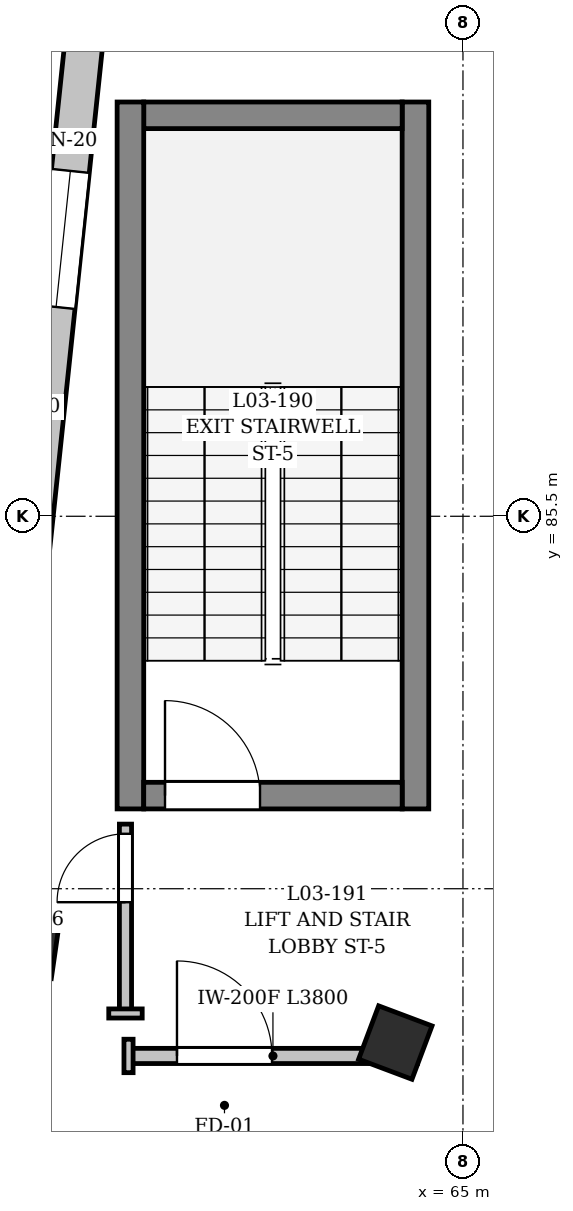
"""IFC4 building model, lengths in metres.
Left out: names, types, materials, properties, quantities, classifications, styles, units other than length and angle.
Written with IfcOpenShell. Run it as: python <this file> out.ifc"""

import sys

from ifc_helpers import new_model, si_unit, direction, frame, frame_2d, origin, origin_2d, place, context, subcontext, project, spatial, rectangle, extrude, element, fill, save


model = new_model("IFC4")
c1 = context("Model", 3, precision=1e-05, world=origin(), true_north=direction((0.0, 1.0)))
c2 = subcontext(c1, "Body", "Model", "MODEL_VIEW")
j1 = project(units=[si_unit("LENGTHUNIT", "METRE"), si_unit("PLANEANGLEUNIT", "RADIAN")], contexts=[c1])
p1 = place(None, origin())
s1 = spatial("IfcSite", under=j1, at=p1, CompositionType="ELEMENT")
p2 = place(p1, origin())
s2 = spatial("IfcBuilding", under=s1, at=p2, CompositionType="ELEMENT")
p3 = place(p2, frame((0.0, 0.0, 10.2)))
s3 = spatial("IfcBuildingStorey", under=s2, at=p3, CompositionType="ELEMENT", Elevation=10.2)
p4 = place(p3, frame((64.11, 78.576, 0.0), z_axis=(0.0, 0.0, 1.0), x_axis=(0.351841648405, 0.936059535739, 0.0)))
e1 = element("IfcColumn", 1, at=p4, inside=s3, PredefinedType="COLUMN", context=c2, shape_type="SweptSolid", body=[
    extrude(rectangle(XDim=0.75, YDim=0.75, at=origin_2d()), origin(), (0.0, 0.0, 1.0), 4.52),
])
p5 = place(p3, frame((59.288, 79.814, 0.0), z_axis=(0.0, 0.0, 1.0), x_axis=(0.142628933706, 0.989776230908, 0.0)))
e2 = element("IfcColumn", 2, at=p5, inside=s3, PredefinedType="COLUMN", context=c2, shape_type="SweptSolid", body=[
    extrude(rectangle(XDim=0.7, YDim=0.7, at=origin_2d()), origin(), (0.0, 0.0, 1.0), 4.52),
])
p6 = place(p3, frame((59.429, 94.029, 0.0), z_axis=(0.0, 0.0, 1.0), x_axis=(-0.104535162797, -0.994521191197, 0.0)))
e3 = element("IfcWall", 3, at=p6, inside=s3, PredefinedType="SOLIDWALL", context=c2, shape_type="SweptSolid", body=[
    extrude(rectangle(XDim=14.27, YDim=0.48, at=frame_2d((7.135, 0.0))), origin(), (0.0, 0.0, 1.0), 3.51),
])
p7 = place(p6, frame((2.835, 0.0, 0.9)))
e4 = element("IfcOpeningElement", 4, at=p7, cuts=e3, PredefinedType="OPENING", context=c2, shape_type="SweptSolid", body=[
    extrude(rectangle(XDim=1.4, YDim=2.05, at=frame_2d((0.7, 1.025))), frame((0.0, 0.25, 0.0), z_axis=(0.0, -1.0, 0.0), x_axis=(1.0, 0.0, 0.0)), (0.0, 0.0, 1.0), 0.5),
])
p8 = place(p6, frame((6.435, 0.0, 0.9)))
e5 = element("IfcOpeningElement", 5, at=p8, cuts=e3, PredefinedType="OPENING", context=c2, shape_type="SweptSolid", body=[
    extrude(rectangle(XDim=1.4, YDim=2.05, at=frame_2d((0.7, 1.025))), frame((0.0, 0.25, 0.0), z_axis=(0.0, -1.0, 0.0), x_axis=(1.0, 0.0, 0.0)), (0.0, 0.0, 1.0), 0.5),
])
p9 = place(p6, frame((10.035, 0.0, 0.9)))
e6 = element("IfcOpeningElement", 6, at=p9, cuts=e3, PredefinedType="OPENING", context=c2, shape_type="SweptSolid", body=[
    extrude(rectangle(XDim=1.4, YDim=2.05, at=frame_2d((0.7, 1.025))), frame((0.0, 0.25, 0.0), z_axis=(0.0, -1.0, 0.0), x_axis=(1.0, 0.0, 0.0)), (0.0, 0.0, 1.0), 0.5),
])
p10 = place(p3, frame((59.311, 85.06, 0.0), z_axis=(0.0, 0.0, 1.0), x_axis=(0.104529993567, 0.994521734526, 0.0)))
e7 = element("IfcWall", 7, at=p10, inside=s3, PredefinedType="SOLIDWALL", context=c2, shape_type="SweptSolid", body=[
    extrude(rectangle(XDim=11.823, YDim=0.5, at=frame_2d((5.911, 0.0))), origin(), (0.0, 0.0, 1.0), 4.52),
])
p11 = place(p10, frame((3.211, 0.0, 0.9)))
e8 = element("IfcOpeningElement", 8, at=p11, cuts=e7, PredefinedType="OPENING", context=c2, shape_type="SweptSolid", body=[
    extrude(rectangle(XDim=1.8, YDim=2.1, at=frame_2d((0.9, 1.05))), frame((0.0, 0.26, 0.0), z_axis=(0.0, -1.0, 0.0), x_axis=(1.0, 0.0, 0.0)), (0.0, 0.0, 1.0), 0.52),
])
p12 = place(p10, frame((6.811, 0.0, 0.9)))
e9 = element("IfcOpeningElement", 9, at=p12, cuts=e7, PredefinedType="OPENING", context=c2, shape_type="SweptSolid", body=[
    extrude(rectangle(XDim=1.8, YDim=2.1, at=frame_2d((0.9, 1.05))), frame((0.0, 0.26, 0.0), z_axis=(0.0, -1.0, 0.0), x_axis=(1.0, 0.0, 0.0)), (0.0, 0.0, 1.0), 0.52),
])
p13 = place(p3, frame((64.375, 81.65, 0.0), z_axis=(0.0, 0.0, 1.0), x_axis=(0.0, 1.0, 0.0)))
e10 = element("IfcWall", 10, at=p13, inside=s3, PredefinedType="SHEAR", context=c2, shape_type="SweptSolid", body=[
    extrude(rectangle(XDim=9.3, YDim=0.35, at=frame_2d((4.65, 0.0))), origin(), (0.0, 0.0, 1.0), 4.52),
])
p14 = place(p3, frame((64.2, 90.775, 0.0), z_axis=(0.0, 0.0, 1.0), x_axis=(-1.0, 0.0, 0.0)))
e11 = element("IfcWall", 11, at=p14, inside=s3, PredefinedType="SHEAR", context=c2, shape_type="SweptSolid", body=[
    extrude(rectangle(XDim=3.4, YDim=0.35, at=frame_2d((1.7, 0.0))), origin(), (0.0, 0.0, 1.0), 4.52),
])
p15 = place(p3, frame((60.625, 90.95, 0.0), z_axis=(0.0, 0.0, 1.0), x_axis=(0.0, -1.0, 0.0)))
e12 = element("IfcWall", 12, at=p15, inside=s3, PredefinedType="SHEAR", context=c2, shape_type="SweptSolid", body=[
    extrude(rectangle(XDim=9.3, YDim=0.35, at=frame_2d((4.65, 0.0))), origin(), (0.0, 0.0, 1.0), 4.52),
])
p16 = place(p3, frame((60.8, 81.825, 0.0), z_axis=(0.0, 0.0, 1.0), x_axis=(1.0, 0.0, 0.0)))
e13 = element("IfcWall", 13, at=p16, inside=s3, PredefinedType="SHEAR", context=c2, shape_type="SweptSolid", body=[
    extrude(rectangle(XDim=3.4, YDim=0.35, at=frame_2d((1.7, 0.0))), origin(), (0.0, 0.0, 1.0), 4.52),
])
p17 = place(p16, frame((0.28, 0.0, 0.0)))
e14 = element("IfcOpeningElement", 14, at=p17, cuts=e13, PredefinedType="OPENING", context=c2, shape_type="SweptSolid", body=[
    extrude(rectangle(XDim=1.25, YDim=2.2, at=frame_2d((0.625, 1.1))), frame((0.0, 0.185, 0.0), z_axis=(0.0, -1.0, 0.0), x_axis=(1.0, 0.0, 0.0)), (0.0, 0.0, 1.0), 0.37),
])
p18 = place(p3, frame((60.6, 78.4, 0.0), z_axis=(0.0, 0.0, 1.0), x_axis=(1.0, 0.0, 0.0)))
e15 = element("IfcWall", 15, at=p18, inside=s3, PredefinedType="PARTITIONING", context=c2, shape_type="SweptSolid", body=[
    extrude(rectangle(XDim=3.8, YDim=0.2, at=frame_2d((1.9, 0.0))), origin(), (0.0, 0.0, 1.0), 3.56),
])
p19 = place(p18, frame((0.637, 0.0, 0.0)))
e16 = element("IfcOpeningElement", 16, at=p19, cuts=e15, PredefinedType="OPENING", context=c2, shape_type="SweptSolid", body=[
    extrude(rectangle(XDim=1.25, YDim=2.2, at=frame_2d((0.625, 1.1))), frame((0.0, 0.11, 0.0), z_axis=(0.0, -1.0, 0.0), x_axis=(1.0, 0.0, 0.0)), (0.0, 0.0, 1.0), 0.22),
])
p20 = place(p3, frame((60.56, 78.959, 0.0), z_axis=(0.0, 0.0, 1.0), x_axis=(0.0, 1.0, 0.0)))
e17 = element("IfcWall", 17, at=p20, inside=s3, PredefinedType="PARTITIONING", context=c2, shape_type="SweptSolid", body=[
    extrude(rectangle(XDim=2.491, YDim=0.16, at=frame_2d((1.246, 0.0))), origin(), (0.0, 0.0, 1.0), 3.91),
])
p21 = place(p20, frame((1.464, 0.0, 0.0)))
e18 = element("IfcOpeningElement", 18, at=p21, cuts=e17, PredefinedType="OPENING", context=c2, shape_type="SweptSolid", body=[
    extrude(rectangle(XDim=0.9, YDim=2.1, at=frame_2d((0.45, 1.05))), frame((0.0, 0.09, 0.0), z_axis=(0.0, -1.0, 0.0), x_axis=(1.0, 0.0, 0.0)), (0.0, 0.0, 1.0), 0.18),
])
p22 = place(p3, frame((60.6, 78.18, 0.0), z_axis=(0.0, 0.0, 1.0), x_axis=(0.0, 1.0, 0.0)))
e19 = element("IfcWall", 19, at=p22, inside=s3, PredefinedType="PARTITIONING", context=c2, shape_type="SweptSolid", body=[
    extrude(rectangle(XDim=0.44, YDim=0.12, at=frame_2d((0.22, 0.0))), origin(), (0.0, 0.0, 1.0), 3.91),
])
p23 = place(p3, frame((60.78, 78.959, 0.0), z_axis=(0.0, 0.0, 1.0), x_axis=(-1.0, 0.0, 0.0)))
e20 = element("IfcWall", 20, at=p23, inside=s3, PredefinedType="PARTITIONING", context=c2, shape_type="SweptSolid", body=[
    extrude(rectangle(XDim=0.44, YDim=0.12, at=frame_2d((0.22, 0.0))), origin(), (0.0, 0.0, 1.0), 4.52),
])
p24 = place(p11, origin())
e21 = element("IfcWindow", 21, at=p24, inside=s3, PartitioningType="DOUBLE_PANEL_VERTICAL", PredefinedType="WINDOW", context=c2, shape_type="SweptSolid", body=[
    extrude(rectangle(XDim=1.8, YDim=2.1, at=frame_2d((0.9, 1.05))), frame((0.0, 0.03, 0.0), z_axis=(0.0, -1.0, 0.0), x_axis=(1.0, 0.0, 0.0)), (0.0, 0.0, 1.0), 0.06),
])
fill(e8, e21)
p25 = place(p17, origin())
e22 = element("IfcDoor", 22, at=p25, inside=s3, OperationType="SINGLE_SWING_RIGHT", PredefinedType="DOOR", context=c2, shape_type="SweptSolid", body=[
    extrude(rectangle(XDim=1.25, YDim=2.2, at=frame_2d((0.625, 1.1))), frame((0.0, 0.025, 0.0), z_axis=(0.0, -1.0, 0.0), x_axis=(1.0, 0.0, 0.0)), (0.0, 0.0, 1.0), 0.05),
])
fill(e14, e22)
p26 = place(p19, origin())
e23 = element("IfcDoor", 23, at=p26, inside=s3, OperationType="SINGLE_SWING_LEFT", PredefinedType="DOOR", context=c2, shape_type="SweptSolid", body=[
    extrude(rectangle(XDim=1.25, YDim=2.2, at=frame_2d((0.625, 1.1))), frame((0.0, 0.025, 0.0), z_axis=(0.0, -1.0, 0.0), x_axis=(1.0, 0.0, 0.0)), (0.0, 0.0, 1.0), 0.05),
])
fill(e16, e23)
p27 = place(p21, origin())
e24 = element("IfcDoor", 24, at=p27, inside=s3, OperationType="SINGLE_SWING_LEFT", PredefinedType="DOOR", context=c2, shape_type="SweptSolid", body=[
    extrude(rectangle(XDim=0.9, YDim=2.1, at=frame_2d((0.45, 1.05))), frame((0.0, 0.025, 0.0), z_axis=(0.0, -1.0, 0.0), x_axis=(1.0, 0.0, 0.0)), (0.0, 0.0, 1.0), 0.05),
])
fill(e18, e24)
save(model, sys.argv[1])
